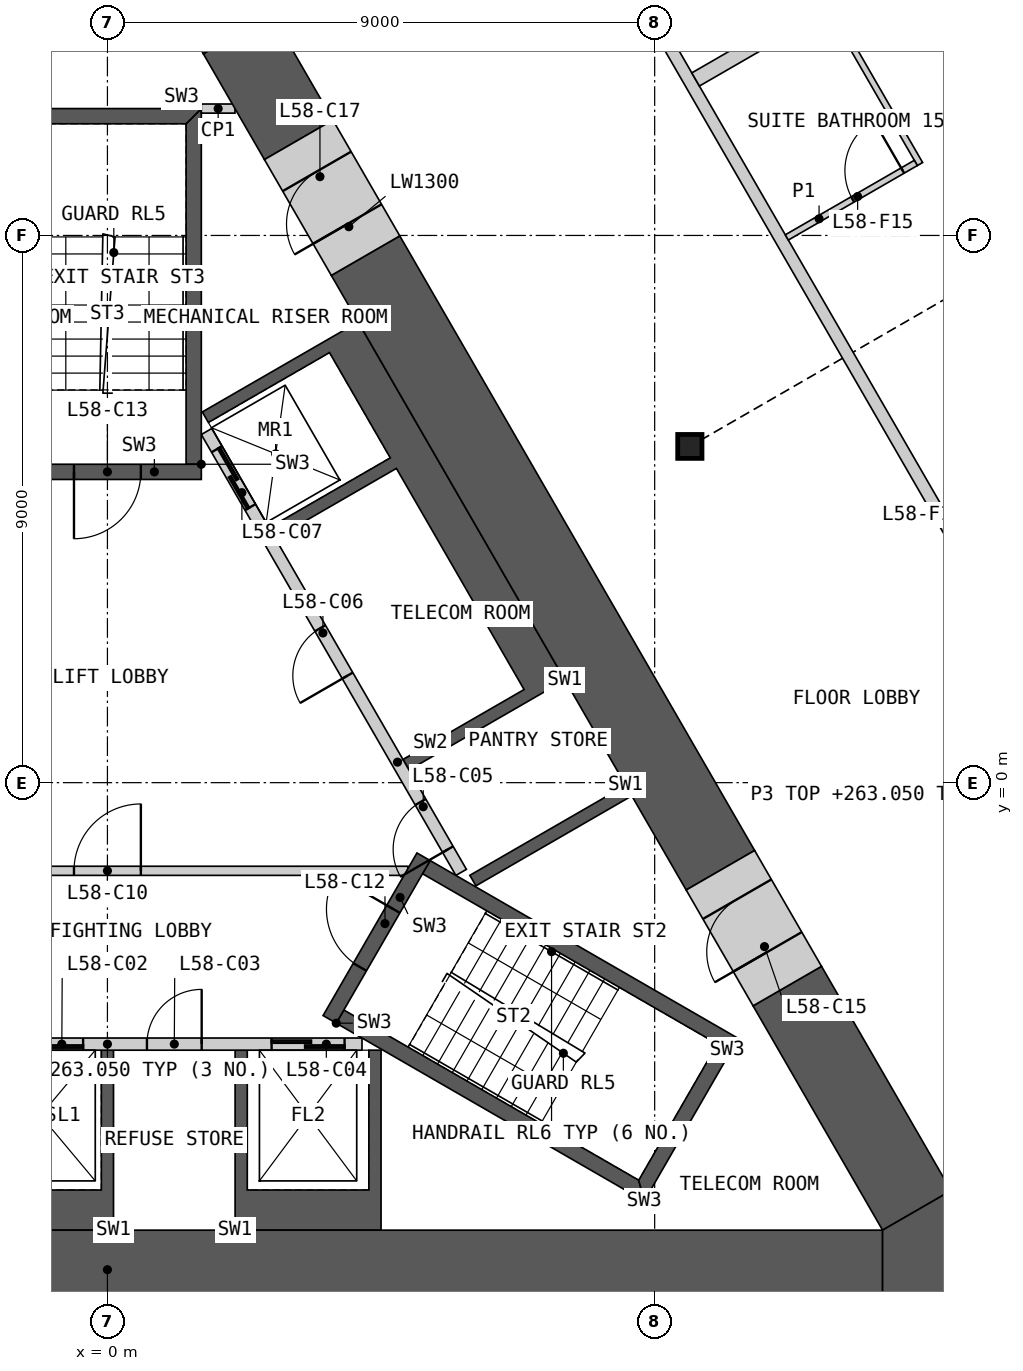
"""IFC4 building model, lengths in metres.
Left out: names, types, materials, properties, quantities, classifications, styles, units other than length and angle.
Written with IfcOpenShell. Run it as: python <this file> out.ifc"""

import sys

from ifc_helpers import new_model, si_unit, direction, frame, frame_2d, origin, origin_2d, place, context, subcontext, project, spatial, polyline, rectangle, i_section, outline, extrude, element, fill, save


model = new_model("IFC4")
c1 = context("Model", 3, precision=1e-05, world=origin(), true_north=direction((0.0, 1.0)))
c2 = subcontext(c1, "Body", "Model", "MODEL_VIEW")
j1 = project(units=[si_unit("LENGTHUNIT", "METRE"), si_unit("PLANEANGLEUNIT", "RADIAN")], contexts=[c1])
p1 = place(None, origin())
s1 = spatial("IfcSite", under=j1, at=p1, CompositionType="ELEMENT")
p2 = place(p1, origin())
s2 = spatial("IfcBuilding", under=s1, at=p2, CompositionType="ELEMENT")
p3 = place(p2, frame((0.0, 0.0, 259.8)))
s3 = spatial("IfcBuildingStorey", under=s2, at=p3, CompositionType="ELEMENT", Elevation=259.8)
p4 = place(p3, frame((9.578, 5.53, 0.0), z_axis=(0.0, 0.0, 1.0), x_axis=(1.0, 0.0, 0.0)))
e1 = element("IfcColumn", 1, at=p4, inside=s3, PredefinedType="COLUMN", context=c2, shape_type="SweptSolid", body=[
    extrude(i_section(OverallWidth=0.399, OverallDepth=0.393, WebThickness=0.023, FlangeThickness=0.037, at=origin_2d()), origin(), (0.0, 0.0, 1.0), 3.6),
])
p5 = place(p3, origin())
e2 = element("IfcWall", 2, at=p5, inside=s3, PredefinedType="SHEAR", context=c2, shape_type="SweptSolid", body=[
    extrude(outline(polyline([(0.1, -7.36), (-4.5, -7.36), (-4.5, -4.4), (-4.3, -4.4), (-4.3, -6.7), (-2.3, -6.7), (-2.3, -4.4), (-2.1, -4.4), (-2.1, -6.7), (-0.1, -6.7), (-0.1, -4.4), (0.1, -4.4), (0.1, -7.36)])), origin(), (0.0, 0.0, 1.0), 3.25),
])
p6 = place(p3, origin())
e3 = element("IfcWall", 3, at=p6, inside=s3, PredefinedType="SHEAR", context=c2, shape_type="SweptSolid", body=[
    extrude(outline(polyline([(2.1, -7.36), (2.1, -4.4), (2.3, -4.4), (2.3, -6.7), (4.3, -6.7), (4.3, -4.4), (4.5, -4.4), (4.5, -7.36), (2.1, -7.36)])), origin(), (0.0, 0.0, 1.0), 3.25),
])
p7 = place(p3, frame((-4.187, -4.3, 0.0), z_axis=(0.0, 0.0, 1.0), x_axis=(1.0, 0.0, 0.0)))
e4 = element("IfcWall", 4, at=p7, inside=s3, PredefinedType="SOLIDWALL", context=c2, shape_type="SweptSolid", body=[
    extrude(rectangle(XDim=8.373, YDim=0.2, at=frame_2d((4.187, 0.0))), origin(), (0.0, 0.0, 1.0), 3.25),
])
p8 = place(p7, frame((0.287, 0.0, 0.0)))
e5 = element("IfcOpeningElement", 5, at=p8, cuts=e4, PredefinedType="OPENING", context=c2, shape_type="SweptSolid", body=[
    extrude(rectangle(XDim=1.2, YDim=2.1, at=frame_2d((0.6, 1.05))), frame((0.0, 0.11, 0.0), z_axis=(0.0, -1.0, 0.0), x_axis=(1.0, 0.0, 0.0)), (0.0, 0.0, 1.0), 0.22),
])
p9 = place(p7, frame((2.387, 0.0, 0.0)))
e6 = element("IfcOpeningElement", 6, at=p9, cuts=e4, PredefinedType="OPENING", context=c2, shape_type="SweptSolid", body=[
    extrude(rectangle(XDim=1.4, YDim=2.1, at=frame_2d((0.7, 1.05))), frame((0.0, 0.11, 0.0), z_axis=(0.0, -1.0, 0.0), x_axis=(1.0, 0.0, 0.0)), (0.0, 0.0, 1.0), 0.22),
])
p10 = place(p7, frame((4.837, 0.0, 0.0)))
e7 = element("IfcOpeningElement", 7, at=p10, cuts=e4, PredefinedType="OPENING", context=c2, shape_type="SweptSolid", body=[
    extrude(rectangle(XDim=0.9, YDim=2.1, at=frame_2d((0.45, 1.05))), frame((0.0, 0.11, 0.0), z_axis=(0.0, -1.0, 0.0), x_axis=(1.0, 0.0, 0.0)), (0.0, 0.0, 1.0), 0.22),
])
p11 = place(p7, frame((6.887, 0.0, 0.0)))
e8 = element("IfcOpeningElement", 8, at=p11, cuts=e4, PredefinedType="OPENING", context=c2, shape_type="SweptSolid", body=[
    extrude(rectangle(XDim=1.2, YDim=2.1, at=frame_2d((0.6, 1.05))), frame((0.0, 0.11, 0.0), z_axis=(0.0, -1.0, 0.0), x_axis=(1.0, 0.0, 0.0)), (0.0, 0.0, 1.0), 0.22),
])
p12 = place(p3, origin())
e9 = element("IfcWall", 9, at=p12, inside=s3, PredefinedType="SHEAR", context=c2, shape_type="SweptSolid", body=[
    extrude(outline(polyline([(8.524, -0.044), (8.624, -0.217), (8.231, -0.444), (6.061, -1.697), (5.96, -1.524), (8.131, -0.271), (8.524, -0.044)])), origin(), (0.0, 0.0, 1.0), 3.25),
])
p13 = place(p3, origin())
e10 = element("IfcWall", 10, at=p13, inside=s3, PredefinedType="SHEAR", context=c2, shape_type="SweptSolid", body=[
    extrude(outline(polyline([(7.524, 1.688), (7.131, 1.461), (4.96, 0.208), (4.861, 0.381), (6.852, 1.531), (4.752, 5.169), (2.76, 4.019), (2.66, 4.192), (4.652, 5.342), (3.652, 7.074), (1.66, 5.924), (1.561, 6.097), (3.731, 7.35), (4.124, 7.577), (7.524, 1.688)])), origin(), (0.0, 0.0, 1.0), 3.25),
])
p14 = place(p3, frame((5.817, -1.476, 0.0), z_axis=(0.0, 0.0, 1.0), x_axis=(-0.500002616675, 0.866023893041, 0.0)))
e11 = element("IfcWall", 11, at=p14, inside=s3, PredefinedType="SOLIDWALL", context=c2, shape_type="SweptSolid", body=[
    extrude(rectangle(XDim=8.373, YDim=0.2, at=frame_2d((4.187, 0.0))), origin(), (0.0, 0.0, 1.0), 3.25),
])
p15 = place(p14, frame((0.437, 0.0, 0.0)))
e12 = element("IfcOpeningElement", 12, at=p15, cuts=e11, PredefinedType="OPENING", context=c2, shape_type="SweptSolid", body=[
    extrude(rectangle(XDim=0.9, YDim=2.1, at=frame_2d((0.45, 1.05))), frame((0.0, 0.11, 0.0), z_axis=(0.0, -1.0, 0.0), x_axis=(1.0, 0.0, 0.0)), (0.0, 0.0, 1.0), 0.22),
])
p16 = place(p14, frame((3.737, 0.0, 0.0)))
e13 = element("IfcOpeningElement", 13, at=p16, cuts=e11, PredefinedType="OPENING", context=c2, shape_type="SweptSolid", body=[
    extrude(rectangle(XDim=0.9, YDim=2.1, at=frame_2d((0.45, 1.05))), frame((0.0, 0.11, 0.0), z_axis=(0.0, -1.0, 0.0), x_axis=(1.0, 0.0, 0.0)), (0.0, 0.0, 1.0), 0.22),
])
p17 = place(p14, frame((6.937, 0.0, 0.0)))
e14 = element("IfcOpeningElement", 14, at=p17, cuts=e11, PredefinedType="OPENING", context=c2, shape_type="SweptSolid", body=[
    extrude(rectangle(XDim=1.1, YDim=2.1, at=frame_2d((0.55, 1.05))), frame((0.0, 0.11, 0.0), z_axis=(0.0, -1.0, 0.0), x_axis=(1.0, 0.0, 0.0)), (0.0, 0.0, 1.0), 0.22),
])
p18 = place(p3, frame((-4.941, -1.45, 0.0), z_axis=(0.0, 0.0, 1.0), x_axis=(1.0, 0.0, 0.0)))
e15 = element("IfcWall", 15, at=p18, inside=s3, PredefinedType="PARTITIONING", context=c2, shape_type="SweptSolid", body=[
    extrude(rectangle(XDim=9.882, YDim=0.15, at=frame_2d((4.941, 0.0))), origin(), (0.0, 0.0, 1.0), 3.25),
])
p19 = place(p18, frame((4.391, 0.0, 0.0)))
e16 = element("IfcOpeningElement", 16, at=p19, cuts=e15, PredefinedType="OPENING", context=c2, shape_type="SweptSolid", body=[
    extrude(rectangle(XDim=1.1, YDim=2.1, at=frame_2d((0.55, 1.05))), frame((0.0, 0.085, 0.0), z_axis=(0.0, -1.0, 0.0), x_axis=(1.0, 0.0, 0.0)), (0.0, 0.0, 1.0), 0.17),
])
p20 = place(p3, origin())
e17 = element("IfcWall", 17, at=p20, inside=s3, PredefinedType="SHEAR", context=c2, shape_type="SweptSolid", body=[
    extrude(outline(polyline([(3.763, -3.956), (8.83, -6.881), (8.738, -6.539), (3.888, -3.739), (3.763, -3.956)])), origin(), (0.0, 0.0, 1.0), 3.25),
])
p21 = place(p3, origin())
e18 = element("IfcWall", 18, at=p21, inside=s3, PredefinedType="SHEAR", context=c2, shape_type="SweptSolid", body=[
    extrude(outline(polyline([(8.83, -6.881), (10.374, -4.206), (10.032, -4.298), (8.738, -6.539), (8.83, -6.881)])), origin(), (0.0, 0.0, 1.0), 3.25),
])
p22 = place(p3, origin())
e19 = element("IfcWall", 19, at=p22, inside=s3, PredefinedType="SHEAR", context=c2, shape_type="SweptSolid", body=[
    extrude(outline(polyline([(10.032, -4.298), (10.374, -4.206), (5.307, -1.281), (5.182, -1.498), (10.032, -4.298)])), origin(), (0.0, 0.0, 1.0), 3.25),
])
p23 = place(p3, frame((3.655, -3.893, 0.0), z_axis=(0.0, 0.0, 1.0), x_axis=(0.499982516597, 0.866035497597, 0.0)))
e20 = element("IfcWall", 20, at=p23, inside=s3, PredefinedType="SHEAR", context=c2, shape_type="SweptSolid", body=[
    extrude(rectangle(XDim=3.088, YDim=0.25, at=frame_2d((1.544, 0.0))), origin(), (0.0, 0.0, 1.0), 3.25),
])
p24 = place(p23, frame((0.994, 0.0, 0.0)))
e21 = element("IfcOpeningElement", 21, at=p24, cuts=e20, PredefinedType="OPENING", context=c2, shape_type="SweptSolid", body=[
    extrude(rectangle(XDim=1.1, YDim=2.1, at=frame_2d((0.55, 1.05))), frame((0.0, 0.135, 0.0), z_axis=(0.0, -1.0, 0.0), x_axis=(1.0, 0.0, 0.0)), (0.0, 0.0, 1.0), 0.27),
])
p25 = place(p3, origin())
e22 = element("IfcWall", 22, at=p25, inside=s3, PredefinedType="SHEAR", context=c2, shape_type="SweptSolid", body=[
    extrude(outline(polyline([(1.544, 5.237), (1.544, 11.087), (1.294, 10.837), (1.294, 5.237), (1.544, 5.237)])), origin(), (0.0, 0.0, 1.0), 3.25),
])
p26 = place(p3, origin())
e23 = element("IfcWall", 23, at=p26, inside=s3, PredefinedType="SHEAR", context=c2, shape_type="SweptSolid", body=[
    extrude(outline(polyline([(1.544, 11.087), (-1.544, 11.087), (-1.294, 10.837), (1.294, 10.837), (1.544, 11.087)])), origin(), (0.0, 0.0, 1.0), 3.25),
])
p27 = place(p3, frame((1.544, 5.112, 0.0), z_axis=(0.0, 0.0, 1.0), x_axis=(-1.0, 0.0, 0.0)))
e24 = element("IfcWall", 24, at=p27, inside=s3, PredefinedType="SHEAR", context=c2, shape_type="SweptSolid", body=[
    extrude(rectangle(XDim=3.088, YDim=0.25, at=frame_2d((1.544, 0.0))), origin(), (0.0, 0.0, 1.0), 3.25),
])
p28 = place(p27, frame((0.994, 0.0, 0.0)))
e25 = element("IfcOpeningElement", 25, at=p28, cuts=e24, PredefinedType="OPENING", context=c2, shape_type="SweptSolid", body=[
    extrude(rectangle(XDim=1.1, YDim=2.1, at=frame_2d((0.55, 1.05))), frame((0.0, 0.135, 0.0), z_axis=(0.0, -1.0, 0.0), x_axis=(1.0, 0.0, 0.0)), (0.0, 0.0, 1.0), 0.27),
])
p29 = place(p3, frame((1.544, 11.087, 0.0), z_axis=(0.0, 0.0, 1.0), x_axis=(1.0, 0.0, 0.0)))
e26 = element("IfcWall", 26, at=p29, inside=s3, PredefinedType="PARTITIONING", context=c2, shape_type="SweptSolid", body=[
    extrude(rectangle(XDim=0.554, YDim=0.15, at=frame_2d((0.277, 0.0))), origin(), (0.0, 0.0, 1.0), 3.25),
])
p30 = place(p3, frame((-12.748, -8.01, 0.0), z_axis=(0.0, 0.0, 1.0), x_axis=(1.0, 0.0, 0.0)))
e27 = element("IfcWall", 27, at=p30, inside=s3, PredefinedType="SHEAR", context=c2, shape_type="SweptSolid", body=[
    extrude(rectangle(XDim=25.497, YDim=1.3, at=frame_2d((12.748, 0.0))), origin(), (0.0, 0.0, 1.0), 3.25),
])
p31 = place(p3, frame((10.081, -1.441, 0.0), z_axis=(0.0, 0.0, 1.0), x_axis=(-0.500006109471, 0.866021876451, 0.0)))
e28 = element("IfcWall", 28, at=p31, inside=s3, PredefinedType="SHEAR", context=c2, shape_type="SweptSolid", body=[
    extrude(rectangle(XDim=11.672, YDim=1.3, at=frame_2d((5.836, 0.0))), origin(), (0.0, 0.0, 1.0), 3.25),
])
p32 = place(p3, frame((13.311, -7.035, 0.0), z_axis=(0.0, 0.0, 1.0), x_axis=(-0.500003555838, 0.866023350811, 0.0)))
e29 = element("IfcWall", 29, at=p32, inside=s3, PredefinedType="SHEAR", context=c2, shape_type="SweptSolid", body=[
    extrude(rectangle(XDim=4.26, YDim=1.3, at=frame_2d((2.13, 0.0))), origin(), (0.0, 0.0, 1.0), 3.25),
])
p33 = place(p3, frame((3.145, 10.573, 0.0), z_axis=(0.0, 0.0, 1.0), x_axis=(-0.500006371327, 0.866021725266, 0.0)))
e30 = element("IfcWall", 30, at=p33, inside=s3, PredefinedType="SHEAR", context=c2, shape_type="SweptSolid", body=[
    extrude(rectangle(XDim=2.01, YDim=1.3, at=frame_2d((1.005, 0.0))), origin(), (0.0, 0.0, 1.0), 3.25),
])
p34 = place(p3, frame((-0.563, 15.045, 0.0), z_axis=(0.0, 0.0, 1.0), x_axis=(-0.499982995661, -0.866035221021, 0.0)))
e31 = element("IfcWall", 31, at=p34, inside=s3, PredefinedType="SHEAR", context=c2, shape_type="SweptSolid", body=[
    extrude(rectangle(XDim=5.164, YDim=1.3, at=frame_2d((2.582, 0.0))), origin(), (0.0, 0.0, 1.0), 3.25),
])
p35 = place(p3, origin())
e32 = element("IfcWall", 32, at=p35, inside=s3, PredefinedType="SHEAR", context=c2, shape_type="SweptSolid", body=[
    extrude(outline(polyline([(12.748, -8.66), (12.748, -7.36), (13.874, -6.71), (15.0, -8.66), (12.748, -8.66)])), origin(), (0.0, 0.0, 1.0), 3.25),
])
p36 = place(p3, frame((11.181, -3.346, 0.0), z_axis=(0.0, 0.0, 1.0), x_axis=(-0.499946605688, 0.86605622881, 0.0)))
e33 = element("IfcWall", 33, at=p36, inside=s3, PredefinedType="SHEAR", context=c2, shape_type="SweptSolid", body=[
    extrude(rectangle(XDim=2.2, YDim=1.3, at=frame_2d((1.1, 0.0))), origin(), (0.0, 0.0, 1.0), 3.25),
])
p37 = place(p36, frame((0.65, 0.0, 0.0)))
e34 = element("IfcOpeningElement", 34, at=p37, cuts=e33, PredefinedType="OPENING", context=c2, shape_type="SweptSolid", body=[
    extrude(rectangle(XDim=1.0, YDim=2.1, at=frame_2d((0.5, 1.05))), frame((0.0, 0.66, 0.0), z_axis=(0.0, -1.0, 0.0), x_axis=(1.0, 0.0, 0.0)), (0.0, 0.0, 1.0), 1.32),
])
p38 = place(p3, frame((2.14, 12.313, 0.0), z_axis=(0.0, 0.0, 1.0), x_axis=(-0.499968102766, 0.866043818878, 0.0)))
e35 = element("IfcWall", 35, at=p38, inside=s3, PredefinedType="SHEAR", context=c2, shape_type="SweptSolid", body=[
    extrude(rectangle(XDim=3.155, YDim=1.3, at=frame_2d((1.577, 0.0))), origin(), (0.0, 0.0, 1.0), 3.25),
])
p39 = place(p38, frame((0.6, 0.0, 0.0)))
e36 = element("IfcOpeningElement", 36, at=p39, cuts=e35, PredefinedType="OPENING", context=c2, shape_type="SweptSolid", body=[
    extrude(rectangle(XDim=1.0, YDim=2.1, at=frame_2d((0.5, 1.05))), frame((0.0, 0.66, 0.0), z_axis=(0.0, -1.0, 0.0), x_axis=(1.0, 0.0, 0.0)), (0.0, 0.0, 1.0), 1.32),
])
p40 = place(p3, frame((4.245, 8.668, 0.0), z_axis=(0.0, 0.0, 1.0), x_axis=(-0.50002983664, 0.866008176907, 0.0)))
e37 = element("IfcWall", 37, at=p40, inside=s3, PredefinedType="SHEAR", context=c2, shape_type="SweptSolid", body=[
    extrude(rectangle(XDim=2.2, YDim=1.3, at=frame_2d((1.1, 0.0))), origin(), (0.0, 0.0, 1.0), 3.25),
])
p41 = place(p40, frame((0.6, 0.0, 0.0)))
e38 = element("IfcOpeningElement", 38, at=p41, cuts=e37, PredefinedType="OPENING", context=c2, shape_type="SweptSolid", body=[
    extrude(rectangle(XDim=1.0, YDim=2.1, at=frame_2d((0.5, 1.05))), frame((0.0, 0.66, 0.0), z_axis=(0.0, -1.0, 0.0), x_axis=(1.0, 0.0, 0.0)), (0.0, 0.0, 1.0), 1.32),
])
p42 = place(p3, frame((5.377, 18.807, 0.0), z_axis=(0.0, 0.0, 1.0), x_axis=(0.499999852422, -0.866025488988, 0.0)))
e39 = element("IfcWall", 39, at=p42, inside=s3, PredefinedType="PARTITIONING", context=c2, shape_type="SweptSolid", body=[
    extrude(rectangle(XDim=27.198, YDim=0.2, at=frame_2d((13.599, 0.0))), origin(), (0.0, 0.0, 1.0), 3.25),
])
p43 = place(p42, frame((25.096, 0.0, 0.0)))
e40 = element("IfcOpeningElement", 40, at=p43, cuts=e39, PredefinedType="OPENING", context=c2, shape_type="SweptSolid", body=[
    extrude(rectangle(XDim=0.95, YDim=2.1, at=frame_2d((0.475, 1.05))), frame((0.0, 0.11, 0.0), z_axis=(0.0, -1.0, 0.0), x_axis=(1.0, 0.0, 0.0)), (0.0, 0.0, 1.0), 0.22),
])
p44 = place(p42, frame((19.122, 0.0, 0.0)))
e41 = element("IfcOpeningElement", 41, at=p44, cuts=e39, PredefinedType="OPENING", context=c2, shape_type="SweptSolid", body=[
    extrude(rectangle(XDim=1.0, YDim=2.1, at=frame_2d((0.5, 1.05))), frame((0.0, 0.11, 0.0), z_axis=(0.0, -1.0, 0.0), x_axis=(1.0, 0.0, 0.0)), (0.0, 0.0, 1.0), 0.22),
])
p45 = place(p42, frame((17.115, 0.0, 0.0)))
e42 = element("IfcOpeningElement", 42, at=p45, cuts=e39, PredefinedType="OPENING", context=c2, shape_type="SweptSolid", body=[
    extrude(rectangle(XDim=1.1, YDim=2.1, at=frame_2d((0.55, 1.05))), frame((0.0, 0.11, 0.0), z_axis=(0.0, -1.0, 0.0), x_axis=(1.0, 0.0, 0.0)), (0.0, 0.0, 1.0), 0.22),
])
p46 = place(p42, frame((0.35, 0.0, 0.0)))
e43 = element("IfcOpeningElement", 43, at=p46, cuts=e39, PredefinedType="OPENING", context=c2, shape_type="SweptSolid", body=[
    extrude(rectangle(XDim=1.1, YDim=2.1, at=frame_2d((0.55, 1.05))), frame((0.0, 0.11, 0.0), z_axis=(0.0, -1.0, 0.0), x_axis=(1.0, 0.0, 0.0)), (0.0, 0.0, 1.0), 0.22),
])
p47 = place(p3, frame((9.673, 11.566, 0.0), z_axis=(0.0, 0.0, 1.0), x_axis=(0.866039966287, 0.499974776157, 0.0)))
e44 = element("IfcWall", 44, at=p47, inside=s3, PredefinedType="PARTITIONING", context=c2, shape_type="SweptSolid", body=[
    extrude(rectangle(XDim=4.635, YDim=0.25, at=frame_2d((2.317, 0.0))), origin(), (0.0, 0.0, 1.0), 2.404),
])
p48 = place(p3, frame((10.313, 15.457, 0.0), z_axis=(0.0, 0.0, 1.0), x_axis=(0.499978833458, -0.866037623948, 0.0)))
e45 = element("IfcWall", 45, at=p48, inside=s3, PredefinedType="PARTITIONING", context=c2, shape_type="SweptSolid", body=[
    extrude(rectangle(XDim=6.1, YDim=0.1, at=frame_2d((3.05, 0.0))), origin(), (0.0, 0.0, 1.0), 2.404),
])
p49 = place(p3, frame((11.173, 8.968, 0.0), z_axis=(0.0, 0.0, 1.0), x_axis=(0.866014668023, 0.500018594424, 0.0)))
e46 = element("IfcWall", 46, at=p49, inside=s3, PredefinedType="PARTITIONING", context=c2, shape_type="SweptSolid", body=[
    extrude(rectangle(XDim=2.45, YDim=0.1, at=frame_2d((1.225, 0.0))), origin(), (0.0, 0.0, 1.0), 2.404),
])
p50 = place(p49, frame((1.25, 0.0, 0.0)))
e47 = element("IfcOpeningElement", 47, at=p50, cuts=e46, PredefinedType="OPENING", context=c2, shape_type="SweptSolid", body=[
    extrude(rectangle(XDim=0.95, YDim=2.1, at=frame_2d((0.475, 1.05))), frame((0.0, 0.06, 0.0), z_axis=(0.0, -1.0, 0.0), x_axis=(1.0, 0.0, 0.0)), (0.0, 0.0, 1.0), 0.12),
])
p51 = place(p9, origin())
e48 = element("IfcDoor", 48, at=p51, inside=s3, OperationType="SLIDING_TO_LEFT", PredefinedType="DOOR", context=c2, shape_type="SweptSolid", body=[
    extrude(rectangle(XDim=1.4, YDim=2.1, at=frame_2d((0.7, 1.05))), frame((0.0, 0.025, 0.0), z_axis=(0.0, -1.0, 0.0), x_axis=(1.0, 0.0, 0.0)), (0.0, 0.0, 1.0), 0.05),
])
fill(e6, e48)
p52 = place(p10, origin())
e49 = element("IfcDoor", 49, at=p52, inside=s3, OperationType="SINGLE_SWING_RIGHT", PredefinedType="DOOR", context=c2, shape_type="SweptSolid", body=[
    extrude(rectangle(XDim=0.9, YDim=2.1, at=frame_2d((0.45, 1.05))), frame((0.0, 0.025, 0.0), z_axis=(0.0, -1.0, 0.0), x_axis=(1.0, 0.0, 0.0)), (0.0, 0.0, 1.0), 0.05),
])
fill(e7, e49)
p53 = place(p11, origin())
e50 = element("IfcDoor", 50, at=p53, inside=s3, OperationType="SLIDING_TO_LEFT", PredefinedType="DOOR", context=c2, shape_type="SweptSolid", body=[
    extrude(rectangle(XDim=1.2, YDim=2.1, at=frame_2d((0.6, 1.05))), frame((0.0, 0.025, 0.0), z_axis=(0.0, -1.0, 0.0), x_axis=(1.0, 0.0, 0.0)), (0.0, 0.0, 1.0), 0.05),
])
fill(e8, e50)
p54 = place(p15, origin())
e51 = element("IfcDoor", 51, at=p54, inside=s3, OperationType="SINGLE_SWING_LEFT", PredefinedType="DOOR", context=c2, shape_type="SweptSolid", body=[
    extrude(rectangle(XDim=0.9, YDim=2.1, at=frame_2d((0.45, 1.05))), frame((0.0, 0.025, 0.0), z_axis=(0.0, -1.0, 0.0), x_axis=(1.0, 0.0, 0.0)), (0.0, 0.0, 1.0), 0.05),
])
fill(e12, e51)
p55 = place(p16, origin())
e52 = element("IfcDoor", 52, at=p55, inside=s3, OperationType="SINGLE_SWING_LEFT", PredefinedType="DOOR", context=c2, shape_type="SweptSolid", body=[
    extrude(rectangle(XDim=0.9, YDim=2.1, at=frame_2d((0.45, 1.05))), frame((0.0, 0.025, 0.0), z_axis=(0.0, -1.0, 0.0), x_axis=(1.0, 0.0, 0.0)), (0.0, 0.0, 1.0), 0.05),
])
fill(e13, e52)
p56 = place(p17, origin())
e53 = element("IfcDoor", 53, at=p56, inside=s3, OperationType="SLIDING_TO_LEFT", PredefinedType="DOOR", context=c2, shape_type="SweptSolid", body=[
    extrude(rectangle(XDim=1.1, YDim=2.1, at=frame_2d((0.55, 1.05))), frame((0.0, 0.025, 0.0), z_axis=(0.0, -1.0, 0.0), x_axis=(1.0, 0.0, 0.0)), (0.0, 0.0, 1.0), 0.05),
])
fill(e14, e53)
p57 = place(p19, origin())
e54 = element("IfcDoor", 54, at=p57, inside=s3, OperationType="SINGLE_SWING_RIGHT", PredefinedType="DOOR", context=c2, shape_type="SweptSolid", body=[
    extrude(rectangle(XDim=1.1, YDim=2.1, at=frame_2d((0.55, 1.05))), frame((0.0, 0.025, 0.0), z_axis=(0.0, -1.0, 0.0), x_axis=(1.0, 0.0, 0.0)), (0.0, 0.0, 1.0), 0.05),
])
fill(e16, e54)
p58 = place(p24, origin())
e55 = element("IfcDoor", 55, at=p58, inside=s3, OperationType="SINGLE_SWING_RIGHT", PredefinedType="DOOR", context=c2, shape_type="SweptSolid", body=[
    extrude(rectangle(XDim=1.1, YDim=2.1, at=frame_2d((0.55, 1.05))), frame((0.0, 0.025, 0.0), z_axis=(0.0, -1.0, 0.0), x_axis=(1.0, 0.0, 0.0)), (0.0, 0.0, 1.0), 0.05),
])
fill(e21, e55)
p59 = place(p28, origin())
e56 = element("IfcDoor", 56, at=p59, inside=s3, OperationType="SINGLE_SWING_RIGHT", PredefinedType="DOOR", context=c2, shape_type="SweptSolid", body=[
    extrude(rectangle(XDim=1.1, YDim=2.1, at=frame_2d((0.55, 1.05))), frame((0.0, 0.025, 0.0), z_axis=(0.0, -1.0, 0.0), x_axis=(1.0, 0.0, 0.0)), (0.0, 0.0, 1.0), 0.05),
])
fill(e25, e56)
p60 = place(p37, origin())
e57 = element("IfcDoor", 57, at=p60, inside=s3, OperationType="SINGLE_SWING_LEFT", PredefinedType="DOOR", context=c2, shape_type="SweptSolid", body=[
    extrude(rectangle(XDim=1.0, YDim=2.1, at=frame_2d((0.5, 1.05))), frame((0.0, 0.405, 0.0), z_axis=(0.0, -1.0, 0.0), x_axis=(1.0, 0.0, 0.0)), (0.0, 0.0, 1.0), 0.05),
])
fill(e34, e57)
p61 = place(p41, origin())
e58 = element("IfcDoor", 58, at=p61, inside=s3, OperationType="SINGLE_SWING_LEFT", PredefinedType="DOOR", context=c2, shape_type="SweptSolid", body=[
    extrude(rectangle(XDim=1.0, YDim=2.1, at=frame_2d((0.5, 1.05))), frame((0.0, 0.405, 0.0), z_axis=(0.0, -1.0, 0.0), x_axis=(1.0, 0.0, 0.0)), (0.0, 0.0, 1.0), 0.05),
])
fill(e38, e58)
p62 = place(p50, origin())
e59 = element("IfcDoor", 59, at=p62, inside=s3, OperationType="SINGLE_SWING_RIGHT", PredefinedType="DOOR", context=c2, shape_type="SweptSolid", body=[
    extrude(rectangle(XDim=0.95, YDim=2.1, at=frame_2d((0.475, 1.05))), frame((0.0, 0.025, 0.0), z_axis=(0.0, -1.0, 0.0), x_axis=(1.0, 0.0, 0.0)), (0.0, 0.0, 1.0), 0.05),
])
fill(e47, e59)
save(model, sys.argv[1])
